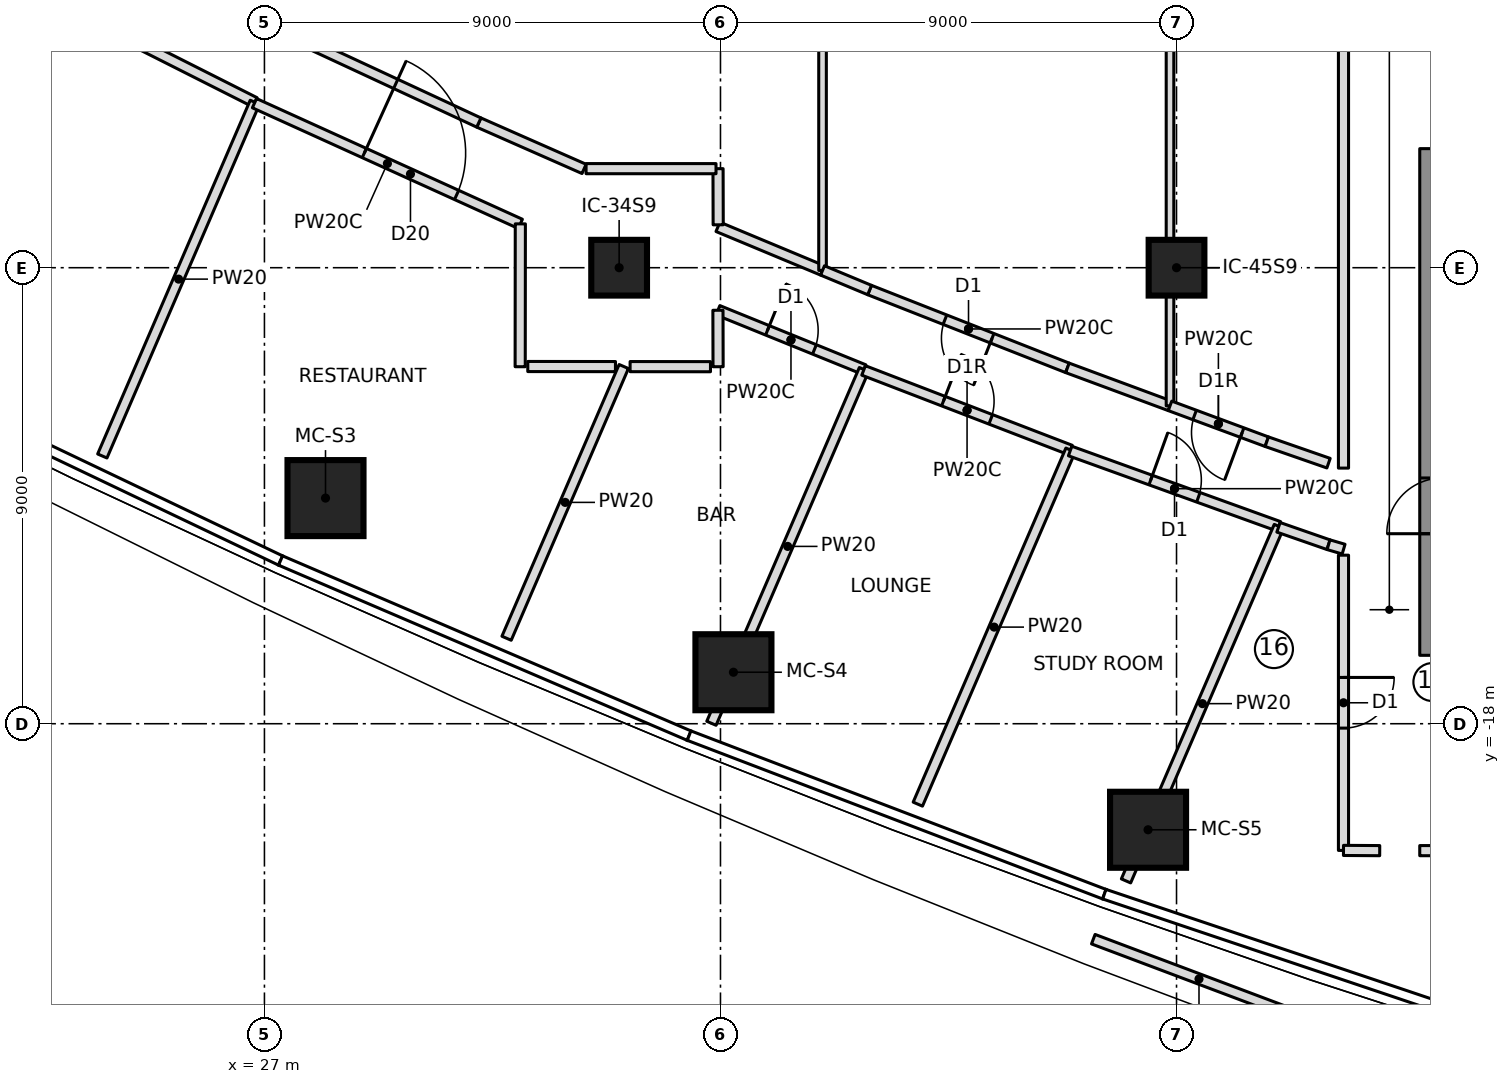
"""IFC4 building model, lengths in metres.
Left out: names, types, materials, properties, quantities, classifications, styles, units other than length and angle.
Written with IfcOpenShell. Run it as: python <this file> out.ifc"""

import sys

from ifc_helpers import new_model, si_unit, direction, frame, frame_2d, origin, origin_2d, place, context, subcontext, project, spatial, rectangle, extrude, element, fill, save


model = new_model("IFC4")
c1 = context("Model", 3, precision=1e-05, world=origin(), true_north=direction((0.0, 1.0)))
c2 = subcontext(c1, "Body", "Model", "MODEL_VIEW")
j1 = project(units=[si_unit("LENGTHUNIT", "METRE"), si_unit("PLANEANGLEUNIT", "RADIAN")], contexts=[c1])
p1 = place(None, origin())
s1 = spatial("IfcSite", under=j1, at=p1, CompositionType="ELEMENT")
p2 = place(p1, origin())
s2 = spatial("IfcBuilding", under=s1, at=p2, CompositionType="ELEMENT")
p3 = place(p2, frame((0.0, 0.0, 125.6)))
s3 = spatial("IfcBuildingStorey", under=s2, at=p3, CompositionType="ELEMENT", Elevation=125.6)
p4 = place(p3, frame((50.25, -16.65, 0.0), z_axis=(0.0, 0.0, 1.0), x_axis=(0.0, 1.0, 0.0)))
e1 = element("IfcWall", 1, at=p4, inside=s3, PredefinedType="SHEAR", context=c2, shape_type="SweptSolid", body=[
    extrude(rectangle(XDim=10.0, YDim=0.9, at=frame_2d((5.0, 0.0))), origin(), (0.0, 0.0, 1.0), 4.6),
])
p5 = place(p4, frame((2.4, 0.0, 0.0)))
e2 = element("IfcOpeningElement", 2, at=p5, cuts=e1, PredefinedType="OPENING", context=c2, shape_type="SweptSolid", body=[
    extrude(rectangle(XDim=1.1, YDim=2.1, at=frame_2d((0.55, 1.05))), frame((0.0, 0.46, 0.0), z_axis=(0.0, -1.0, 0.0), x_axis=(1.0, 0.0, 0.0)), (0.0, 0.0, 1.0), 0.92),
])
for number, where, z_axis, x_axis in (
    (3, (28.205, -13.547, 0.0), (0.0, 0.0, 1.0), (1.0, 0.0, 0.0)),
    (4, (36.256, -16.984, 0.0), (0.0, 0.0, 1.0), (1.0, 0.0, 0.0)),
    (5, (44.438, -20.093, 0.0), (0.0, 0.0, 1.0), (1.0, 0.0, 0.0)),
):
    element("IfcColumn", number, at=place(p3, frame(where, z_axis=z_axis, x_axis=x_axis)), inside=s3, PredefinedType="COLUMN", context=c2, shape_type="SweptSolid", body=[
        extrude(rectangle(XDim=1.5, YDim=1.5, at=origin_2d()), origin(), (0.0, 0.0, 1.0), 4.6),
    ])
for number, where, z_axis, x_axis in (
    (6, (34.0, -9.0, 0.0), (0.0, 0.0, 1.0), (1.0, 0.0, 0.0)),
    (7, (45.0, -9.0, 0.0), (0.0, 0.0, 1.0), (1.0, 0.0, 0.0)),
):
    element("IfcColumn", number, at=place(p3, frame(where, z_axis=z_axis, x_axis=x_axis)), inside=s3, PredefinedType="COLUMN", context=c2, shape_type="SweptSolid", body=[
        extrude(rectangle(XDim=1.1, YDim=1.1, at=origin_2d()), origin(), (0.0, 0.0, 1.0), 4.6),
    ])
p6 = place(p3, frame((43.357, -22.252, 0.0), z_axis=(0.0, 0.0, 1.0), x_axis=(0.935866998846, -0.352353459569, 0.0)))
e8 = element("IfcWall", 8, at=p6, inside=s3, PredefinedType="PARAPET", context=c2, shape_type="SweptSolid", body=[
    extrude(rectangle(XDim=4.458, YDim=0.2, at=frame_2d((2.229, 0.0))), origin(), (0.0, 0.0, 1.0), 1.1),
])
p7 = place(p3, frame((17.95, -1.261, 0.0), z_axis=(0.0, 0.0, 1.0), x_axis=(0.892679126003, -0.450692775623, 0.0)))
e9 = element("IfcWall", 9, at=p7, inside=s3, PredefinedType="PARTITIONING", context=c2, shape_type="SweptSolid", body=[
    extrude(rectangle(XDim=9.927, YDim=0.2, at=frame_2d((4.963, 0.0))), origin(), (0.0, 0.0, 1.0), 4.3),
])
p8 = place(p7, frame((4.463, 0.0, 0.0)))
e10 = element("IfcOpeningElement", 10, at=p8, cuts=e9, PredefinedType="OPENING", context=c2, shape_type="SweptSolid", body=[
    extrude(rectangle(XDim=2.0, YDim=2.4, at=frame_2d((1.0, 1.2))), frame((0.0, 0.11, 0.0), z_axis=(0.0, -1.0, 0.0), x_axis=(1.0, 0.0, 0.0)), (0.0, 0.0, 1.0), 0.22),
])
p9 = place(p3, frame((23.801, -12.716, 0.0), z_axis=(0.0, 0.0, 1.0), x_axis=(0.395995556294, 0.918252426839, 0.0)))
e11 = element("IfcWall", 11, at=p9, inside=s3, PredefinedType="PARTITIONING", context=c2, shape_type="SweptSolid", body=[
    extrude(rectangle(XDim=7.603, YDim=0.2, at=frame_2d((3.802, 0.0))), origin(), (0.0, 0.0, 1.0), 4.3),
])
p10 = place(p3, frame((26.803, -5.753, 0.0), z_axis=(0.0, 0.0, 1.0), x_axis=(0.910552112877, -0.41339430298, 0.0)))
e12 = element("IfcWall", 12, at=p10, inside=s3, PredefinedType="PARTITIONING", context=c2, shape_type="SweptSolid", body=[
    extrude(rectangle(XDim=5.762, YDim=0.2, at=frame_2d((2.881, 0.0))), origin(), (0.0, 0.0, 1.0), 4.3),
])
p11 = place(p10, frame((2.381, 0.0, 0.0)))
e13 = element("IfcOpeningElement", 13, at=p11, cuts=e12, PredefinedType="OPENING", context=c2, shape_type="SweptSolid", body=[
    extrude(rectangle(XDim=2.0, YDim=2.4, at=frame_2d((1.0, 1.2))), frame((0.0, 0.11, 0.0), z_axis=(0.0, -1.0, 0.0), x_axis=(1.0, 0.0, 0.0)), (0.0, 0.0, 1.0), 0.22),
])
p12 = place(p3, frame((31.779, -16.313, 0.0), z_axis=(0.0, 0.0, 1.0), x_axis=(0.395991607501, 0.918254129742, 0.0)))
e14 = element("IfcWall", 14, at=p12, inside=s3, PredefinedType="PARTITIONING", context=c2, shape_type="SweptSolid", body=[
    extrude(rectangle(XDim=5.841, YDim=0.2, at=frame_2d((2.92, 0.0))), origin(), (0.0, 0.0, 1.0), 4.3),
])
p13 = place(p3, frame((35.95, -9.84, 0.0), z_axis=(0.0, 0.0, 1.0), x_axis=(0.926663171188, -0.375892760191, 0.0)))
e15 = element("IfcWall", 15, at=p13, inside=s3, PredefinedType="PARTITIONING", context=c2, shape_type="SweptSolid", body=[
    extrude(rectangle(XDim=3.11, YDim=0.2, at=frame_2d((1.555, 0.0))), origin(), (0.0, 0.0, 1.0), 4.3),
])
p14 = place(p13, frame((1.055, 0.0, 0.0)))
e16 = element("IfcOpeningElement", 16, at=p14, cuts=e15, PredefinedType="OPENING", context=c2, shape_type="SweptSolid", body=[
    extrude(rectangle(XDim=1.0, YDim=2.1, at=frame_2d((0.5, 1.05))), frame((0.0, 0.11, 0.0), z_axis=(0.0, -1.0, 0.0), x_axis=(1.0, 0.0, 0.0)), (0.0, 0.0, 1.0), 0.22),
])
p15 = place(p3, frame((35.821, -17.991, 0.0), z_axis=(0.0, 0.0, 1.0), x_axis=(0.395987603644, 0.918255856371, 0.0)))
e17 = element("IfcWall", 17, at=p15, inside=s3, PredefinedType="PARTITIONING", context=c2, shape_type="SweptSolid", body=[
    extrude(rectangle(XDim=7.604, YDim=0.2, at=frame_2d((3.802, 0.0))), origin(), (0.0, 0.0, 1.0), 4.3),
])
p16 = place(p3, frame((38.824, -11.028, 0.0), z_axis=(0.0, 0.0, 1.0), x_axis=(0.933279441896, -0.359151059215, 0.0)))
e18 = element("IfcWall", 18, at=p16, inside=s3, PredefinedType="PARTITIONING", context=c2, shape_type="SweptSolid", body=[
    extrude(rectangle(XDim=4.376, YDim=0.2, at=frame_2d((2.188, 0.0))), origin(), (0.0, 0.0, 1.0), 4.3),
])
p17 = place(p16, frame((1.688, 0.0, 0.0)))
e19 = element("IfcOpeningElement", 19, at=p17, cuts=e18, PredefinedType="OPENING", context=c2, shape_type="SweptSolid", body=[
    extrude(rectangle(XDim=1.0, YDim=2.1, at=frame_2d((0.5, 1.05))), frame((0.0, 0.11, 0.0), z_axis=(0.0, -1.0, 0.0), x_axis=(1.0, 0.0, 0.0)), (0.0, 0.0, 1.0), 0.22),
])
p18 = place(p3, frame((39.895, -19.587, 0.0), z_axis=(0.0, 0.0, 1.0), x_axis=(0.395993528256, 0.918253301426, 0.0)))
e20 = element("IfcWall", 20, at=p18, inside=s3, PredefinedType="PARTITIONING", context=c2, shape_type="SweptSolid", body=[
    extrude(rectangle(XDim=7.61, YDim=0.2, at=frame_2d((3.805, 0.0))), origin(), (0.0, 0.0, 1.0), 4.3),
])
p19 = place(p3, frame((42.9, -12.617, 0.0), z_axis=(0.0, 0.0, 1.0), x_axis=(0.940555877924, -0.339638985546, 0.0)))
e21 = element("IfcWall", 21, at=p19, inside=s3, PredefinedType="PARTITIONING", context=c2, shape_type="SweptSolid", body=[
    extrude(rectangle(XDim=4.381, YDim=0.2, at=frame_2d((2.19, 0.0))), origin(), (0.0, 0.0, 1.0), 4.3),
])
p20 = place(p19, frame((1.69, 0.0, 0.0)))
e22 = element("IfcOpeningElement", 22, at=p20, cuts=e21, PredefinedType="OPENING", context=c2, shape_type="SweptSolid", body=[
    extrude(rectangle(XDim=1.0, YDim=2.1, at=frame_2d((0.5, 1.05))), frame((0.0, 0.11, 0.0), z_axis=(0.0, -1.0, 0.0), x_axis=(1.0, 0.0, 0.0)), (0.0, 0.0, 1.0), 0.22),
])
p21 = place(p3, frame((44.003, -21.102, 0.0), z_axis=(0.0, 0.0, 1.0), x_axis=(0.39600636385, 0.918247766014, 0.0)))
e23 = element("IfcWall", 23, at=p21, inside=s3, PredefinedType="PARTITIONING", context=c2, shape_type="SweptSolid", body=[
    extrude(rectangle(XDim=7.62, YDim=0.2, at=frame_2d((3.81, 0.0))), origin(), (0.0, 0.0, 1.0), 4.3),
])
p22 = place(p3, frame((38.014, -9.054, 0.0), z_axis=(0.0, 0.0, 1.0), x_axis=(-0.92299615886, 0.384809161441, 0.0)))
e24 = element("IfcWall", 24, at=p22, inside=s3, PredefinedType="PARTITIONING", context=c2, shape_type="SweptSolid", body=[
    extrude(rectangle(XDim=2.236, YDim=0.2, at=frame_2d((1.118, 0.0))), origin(), (0.0, 0.0, 1.0), 4.3),
])
p23 = place(p3, frame((33.308, -7.05, 0.0), z_axis=(0.0, 0.0, 1.0), x_axis=(-0.915102334452, 0.403221672881, 0.0)))
e25 = element("IfcWall", 25, at=p23, inside=s3, PredefinedType="PARTITIONING", context=c2, shape_type="SweptSolid", body=[
    extrude(rectangle(XDim=2.269, YDim=0.2, at=frame_2d((1.135, 0.0))), origin(), (0.0, 0.0, 1.0), 4.3),
])
p24 = place(p3, frame((31.231, -6.135, 0.0), z_axis=(0.0, 0.0, 1.0), x_axis=(-0.906830275285, 0.421495968933, 0.0)))
e26 = element("IfcWall", 26, at=p24, inside=s3, PredefinedType="PARTITIONING", context=c2, shape_type="SweptSolid", body=[
    extrude(rectangle(XDim=4.195, YDim=0.2, at=frame_2d((2.098, 0.0))), origin(), (0.0, 0.0, 1.0), 4.3),
])
p25 = place(p3, frame((38.014, -9.054, 0.0), z_axis=(0.0, 0.0, 1.0), x_axis=(0.0, 1.0, 0.0)))
e27 = element("IfcWall", 27, at=p25, inside=s3, PredefinedType="PARTITIONING", context=c2, shape_type="SweptSolid", body=[
    extrude(rectangle(XDim=18.107, YDim=0.15, at=frame_2d((9.054, 0.0))), origin(), (0.0, 0.0, 1.0), 4.3),
])
p26 = place(p3, frame((42.847, -10.977, 0.0), z_axis=(0.0, 0.0, 1.0), x_axis=(-0.930576677263, 0.36609704688, 0.0)))
e28 = element("IfcWall", 28, at=p26, inside=s3, PredefinedType="PARTITIONING", context=c2, shape_type="SweptSolid", body=[
    extrude(rectangle(XDim=4.195, YDim=0.2, at=frame_2d((2.098, 0.0))), origin(), (0.0, 0.0, 1.0), 4.3),
])
p27 = place(p26, frame((1.598, 0.0, 0.0)))
e29 = element("IfcOpeningElement", 29, at=p27, cuts=e28, PredefinedType="OPENING", context=c2, shape_type="SweptSolid", body=[
    extrude(rectangle(XDim=1.0, YDim=2.1, at=frame_2d((0.5, 1.05))), frame((0.0, 0.11, 0.0), z_axis=(0.0, -1.0, 0.0), x_axis=(1.0, 0.0, 0.0)), (0.0, 0.0, 1.0), 0.22),
])
p28 = place(p3, frame((44.871, -11.727, 0.0), z_axis=(0.0, 0.0, 1.0), x_axis=(-0.937739210033, 0.347340141601, 0.0)))
e30 = element("IfcWall", 30, at=p28, inside=s3, PredefinedType="PARTITIONING", context=c2, shape_type="SweptSolid", body=[
    extrude(rectangle(XDim=2.158, YDim=0.2, at=frame_2d((1.079, 0.0))), origin(), (0.0, 0.0, 1.0), 4.3),
])
p29 = place(p3, frame((38.943, -9.441, 0.0), z_axis=(0.0, 0.0, 1.0), x_axis=(-0.923026676209, 0.384735954919, 0.0)))
e31 = element("IfcWall", 31, at=p29, inside=s3, PredefinedType="PARTITIONING", context=c2, shape_type="SweptSolid", body=[
    extrude(rectangle(XDim=1.006, YDim=0.2, at=frame_2d((0.503, 0.0))), origin(), (0.0, 0.0, 1.0), 4.3),
])
p30 = place(p3, frame((44.871, -11.727, 0.0), z_axis=(0.0, 0.0, 1.0), x_axis=(0.0, 1.0, 0.0)))
e32 = element("IfcWall", 32, at=p30, inside=s3, PredefinedType="PARTITIONING", context=c2, shape_type="SweptSolid", body=[
    extrude(rectangle(XDim=23.453, YDim=0.15, at=frame_2d((11.727, 0.0))), origin(), (0.0, 0.0, 1.0), 4.3),
])
p31 = place(p3, frame((46.781, -12.434, 0.0), z_axis=(0.0, 0.0, 1.0), x_axis=(-0.937725623728, 0.347376819323, 0.0)))
e33 = element("IfcWall", 33, at=p31, inside=s3, PredefinedType="PARTITIONING", context=c2, shape_type="SweptSolid", body=[
    extrude(rectangle(XDim=2.037, YDim=0.2, at=frame_2d((1.019, 0.0))), origin(), (0.0, 0.0, 1.0), 4.3),
])
p32 = place(p31, frame((0.518, 0.0, 0.0)))
e34 = element("IfcOpeningElement", 34, at=p32, cuts=e33, PredefinedType="OPENING", context=c2, shape_type="SweptSolid", body=[
    extrude(rectangle(XDim=1.0, YDim=2.1, at=frame_2d((0.5, 1.05))), frame((0.0, 0.11, 0.0), z_axis=(0.0, -1.0, 0.0), x_axis=(1.0, 0.0, 0.0)), (0.0, 0.0, 1.0), 0.22),
])
p33 = place(p3, frame((49.8, -20.505, 0.0), z_axis=(0.0, 0.0, 1.0), x_axis=(1.0, 0.0, 0.0)))
e35 = element("IfcWall", 35, at=p33, inside=s3, PredefinedType="PARTITIONING", context=c2, shape_type="SweptSolid", body=[
    extrude(rectangle(XDim=12.133, YDim=0.2, at=frame_2d((6.066, 0.0))), origin(), (0.0, 0.0, 1.0), 4.3),
])
p34 = place(p33, frame((5.566, 0.0, 0.0)))
e36 = element("IfcOpeningElement", 36, at=p34, cuts=e35, PredefinedType="OPENING", context=c2, shape_type="SweptSolid", body=[
    extrude(rectangle(XDim=1.5, YDim=2.1, at=frame_2d((0.75, 1.05))), frame((0.0, 0.11, 0.0), z_axis=(0.0, -1.0, 0.0), x_axis=(1.0, 0.0, 0.0)), (0.0, 0.0, 1.0), 0.22),
])
p35 = place(p3, frame((47.012, -14.124, 0.0), z_axis=(0.0, 0.0, 1.0), x_axis=(0.944566081842, -0.32832136244, 0.0)))
e37 = element("IfcWall", 37, at=p35, inside=s3, PredefinedType="PARTITIONING", context=c2, shape_type="SweptSolid", body=[
    extrude(rectangle(XDim=1.045, YDim=0.2, at=frame_2d((0.523, 0.0))), origin(), (0.0, 0.0, 1.0), 4.3),
])
p36 = place(p3, frame((48.0, -12.858, 0.0), z_axis=(0.0, 0.0, 1.0), x_axis=(-0.944517215109, 0.328461916152, 0.0)))
e38 = element("IfcWall", 38, at=p36, inside=s3, PredefinedType="PARTITIONING", context=c2, shape_type="SweptSolid", body=[
    extrude(rectangle(XDim=1.29, YDim=0.2, at=frame_2d((0.645, 0.0))), origin(), (0.0, 0.0, 1.0), 4.3),
])
p37 = place(p3, frame((35.955, -8.154, 0.0), z_axis=(0.0, 0.0, 1.0), x_axis=(-0.002643744892, 0.9999965053, 0.0)))
e39 = element("IfcWall", 39, at=p37, inside=s3, PredefinedType="PARTITIONING", context=c2, shape_type="SweptSolid", body=[
    extrude(rectangle(XDim=1.108, YDim=0.2, at=frame_2d((0.554, 0.0))), origin(), (0.0, 0.0, 1.0), 4.3),
])
p38 = place(p3, frame((35.912, -7.045, 0.0), z_axis=(0.0, 0.0, 1.0), x_axis=(-0.999999981873, 0.000190403652, 0.0)))
e40 = element("IfcWall", 40, at=p38, inside=s3, PredefinedType="PARTITIONING", context=c2, shape_type="SweptSolid", body=[
    extrude(rectangle(XDim=2.564, YDim=0.2, at=frame_2d((1.282, 0.0))), origin(), (0.0, 0.0, 1.0), 4.3),
])
p39 = place(p3, frame((48.295, 12.955, 0.0), z_axis=(0.0, 0.0, 1.0), x_axis=(0.0, -1.0, 0.0)))
e41 = element("IfcWall", 41, at=p39, inside=s3, PredefinedType="PARTITIONING", context=c2, shape_type="SweptSolid", body=[
    extrude(rectangle(XDim=25.91, YDim=0.2, at=frame_2d((12.955, 0.0))), origin(), (0.0, 0.0, 1.0), 4.3),
])
p40 = place(p3, frame((32.05, -8.135, 0.0), z_axis=(0.0, 0.0, 1.0), x_axis=(-0.001039230408, -0.99999946, 0.0)))
e42 = element("IfcWall", 42, at=p40, inside=s3, PredefinedType="PARTITIONING", context=c2, shape_type="SweptSolid", body=[
    extrude(rectangle(XDim=2.819, YDim=0.2, at=frame_2d((1.41, 0.0))), origin(), (0.0, 0.0, 1.0), 4.3),
])
p41 = place(p3, frame((35.953, -10.954, 0.0), z_axis=(0.0, 0.0, 1.0), x_axis=(-0.00262983969, 0.999996541966, 0.0)))
e43 = element("IfcWall", 43, at=p41, inside=s3, PredefinedType="PARTITIONING", context=c2, shape_type="SweptSolid", body=[
    extrude(rectangle(XDim=1.114, YDim=0.2, at=frame_2d((0.557, 0.0))), origin(), (0.0, 0.0, 1.0), 4.3),
])
p42 = place(p3, frame((48.0, -14.467, 0.0), z_axis=(0.0, 0.0, 1.0), x_axis=(0.959415658226, -0.281995735341, 0.0)))
e44 = element("IfcWall", 44, at=p42, inside=s3, PredefinedType="PARTITIONING", context=c2, shape_type="SweptSolid", body=[
    extrude(rectangle(XDim=0.31, YDim=0.2, at=frame_2d((0.155, 0.0))), origin(), (0.0, 0.0, 1.0), 4.3),
])
p43 = place(p3, frame((48.295, -14.674, 0.0), z_axis=(0.0, 0.0, 1.0), x_axis=(0.0, -1.0, 0.0)))
e45 = element("IfcWall", 45, at=p43, inside=s3, PredefinedType="PARTITIONING", context=c2, shape_type="SweptSolid", body=[
    extrude(rectangle(XDim=5.827, YDim=0.2, at=frame_2d((2.914, 0.0))), origin(), (0.0, 0.0, 1.0), 4.3),
])
p44 = place(p43, frame((2.413, 0.0, 0.0)))
e46 = element("IfcOpeningElement", 46, at=p44, cuts=e45, PredefinedType="OPENING", context=c2, shape_type="SweptSolid", body=[
    extrude(rectangle(XDim=1.0, YDim=2.1, at=frame_2d((0.5, 1.05))), frame((0.0, 0.11, 0.0), z_axis=(0.0, -1.0, 0.0), x_axis=(1.0, 0.0, 0.0)), (0.0, 0.0, 1.0), 0.22),
])
p45 = place(p3, frame((48.295, -20.5, 0.0), z_axis=(0.0, 0.0, 1.0), x_axis=(0.999981117305, -0.006145326088, 0.0)))
e47 = element("IfcWall", 47, at=p45, inside=s3, PredefinedType="PARTITIONING", context=c2, shape_type="SweptSolid", body=[
    extrude(rectangle(XDim=0.715, YDim=0.2, at=frame_2d((0.357, 0.0))), origin(), (0.0, 0.0, 1.0), 4.3),
])
p46 = place(p3, frame((33.927, -10.952, 0.0), z_axis=(0.0, 0.0, 1.0), x_axis=(-0.999999512201, 0.00098772352, 0.0)))
e48 = element("IfcWall", 48, at=p46, inside=s3, PredefinedType="PARTITIONING", context=c2, shape_type="SweptSolid", body=[
    extrude(rectangle(XDim=1.73, YDim=0.2, at=frame_2d((0.865, 0.0))), origin(), (0.0, 0.0, 1.0), 4.3),
])
p47 = place(p3, frame((35.803, -10.954, 0.0), z_axis=(0.0, 0.0, 1.0), x_axis=(-0.999999573702, 0.000923360641, 0.0)))
e49 = element("IfcWall", 49, at=p47, inside=s3, PredefinedType="PARTITIONING", context=c2, shape_type="SweptSolid", body=[
    extrude(rectangle(XDim=1.586, YDim=0.2, at=frame_2d((0.793, 0.0))), origin(), (0.0, 0.0, 1.0), 4.3),
])
p48 = place(p11, origin())
e50 = element("IfcDoor", 50, at=p48, inside=s3, OperationType="DOUBLE_DOOR_SINGLE_SWING", PredefinedType="DOOR", context=c2, shape_type="SweptSolid", body=[
    extrude(rectangle(XDim=2.0, YDim=2.4, at=frame_2d((1.0, 1.2))), frame((0.0, 0.025, 0.0), z_axis=(0.0, -1.0, 0.0), x_axis=(1.0, 0.0, 0.0)), (0.0, 0.0, 1.0), 0.05),
])
fill(e13, e50)
p49 = place(p14, origin())
e51 = element("IfcDoor", 51, at=p49, inside=s3, OperationType="SINGLE_SWING_LEFT", PredefinedType="DOOR", context=c2, shape_type="SweptSolid", body=[
    extrude(rectangle(XDim=1.0, YDim=2.1, at=frame_2d((0.5, 1.05))), frame((0.0, 0.025, 0.0), z_axis=(0.0, -1.0, 0.0), x_axis=(1.0, 0.0, 0.0)), (0.0, 0.0, 1.0), 0.05),
])
fill(e16, e51)
p50 = place(p17, origin())
e52 = element("IfcDoor", 52, at=p50, inside=s3, OperationType="SINGLE_SWING_RIGHT", PredefinedType="DOOR", context=c2, shape_type="SweptSolid", body=[
    extrude(rectangle(XDim=1.0, YDim=2.1, at=frame_2d((0.5, 1.05))), frame((0.0, 0.025, 0.0), z_axis=(0.0, -1.0, 0.0), x_axis=(1.0, 0.0, 0.0)), (0.0, 0.0, 1.0), 0.05),
])
fill(e19, e52)
p51 = place(p20, origin())
e53 = element("IfcDoor", 53, at=p51, inside=s3, OperationType="SINGLE_SWING_LEFT", PredefinedType="DOOR", context=c2, shape_type="SweptSolid", body=[
    extrude(rectangle(XDim=1.0, YDim=2.1, at=frame_2d((0.5, 1.05))), frame((0.0, 0.025, 0.0), z_axis=(0.0, -1.0, 0.0), x_axis=(1.0, 0.0, 0.0)), (0.0, 0.0, 1.0), 0.05),
])
fill(e22, e53)
p52 = place(p27, origin())
e54 = element("IfcDoor", 54, at=p52, inside=s3, OperationType="SINGLE_SWING_LEFT", PredefinedType="DOOR", context=c2, shape_type="SweptSolid", body=[
    extrude(rectangle(XDim=1.0, YDim=2.1, at=frame_2d((0.5, 1.05))), frame((0.0, 0.025, 0.0), z_axis=(0.0, -1.0, 0.0), x_axis=(1.0, 0.0, 0.0)), (0.0, 0.0, 1.0), 0.05),
])
fill(e29, e54)
p53 = place(p32, origin())
e55 = element("IfcDoor", 55, at=p53, inside=s3, OperationType="SINGLE_SWING_RIGHT", PredefinedType="DOOR", context=c2, shape_type="SweptSolid", body=[
    extrude(rectangle(XDim=1.0, YDim=2.1, at=frame_2d((0.5, 1.05))), frame((0.0, 0.025, 0.0), z_axis=(0.0, -1.0, 0.0), x_axis=(1.0, 0.0, 0.0)), (0.0, 0.0, 1.0), 0.05),
])
fill(e34, e55)
p54 = place(p44, origin())
e56 = element("IfcDoor", 56, at=p54, inside=s3, OperationType="SINGLE_SWING_LEFT", PredefinedType="DOOR", context=c2, shape_type="SweptSolid", body=[
    extrude(rectangle(XDim=1.0, YDim=2.1, at=frame_2d((0.5, 1.05))), frame((0.0, 0.025, 0.0), z_axis=(0.0, -1.0, 0.0), x_axis=(1.0, 0.0, 0.0)), (0.0, 0.0, 1.0), 0.05),
])
fill(e46, e56)
save(model, sys.argv[1])
